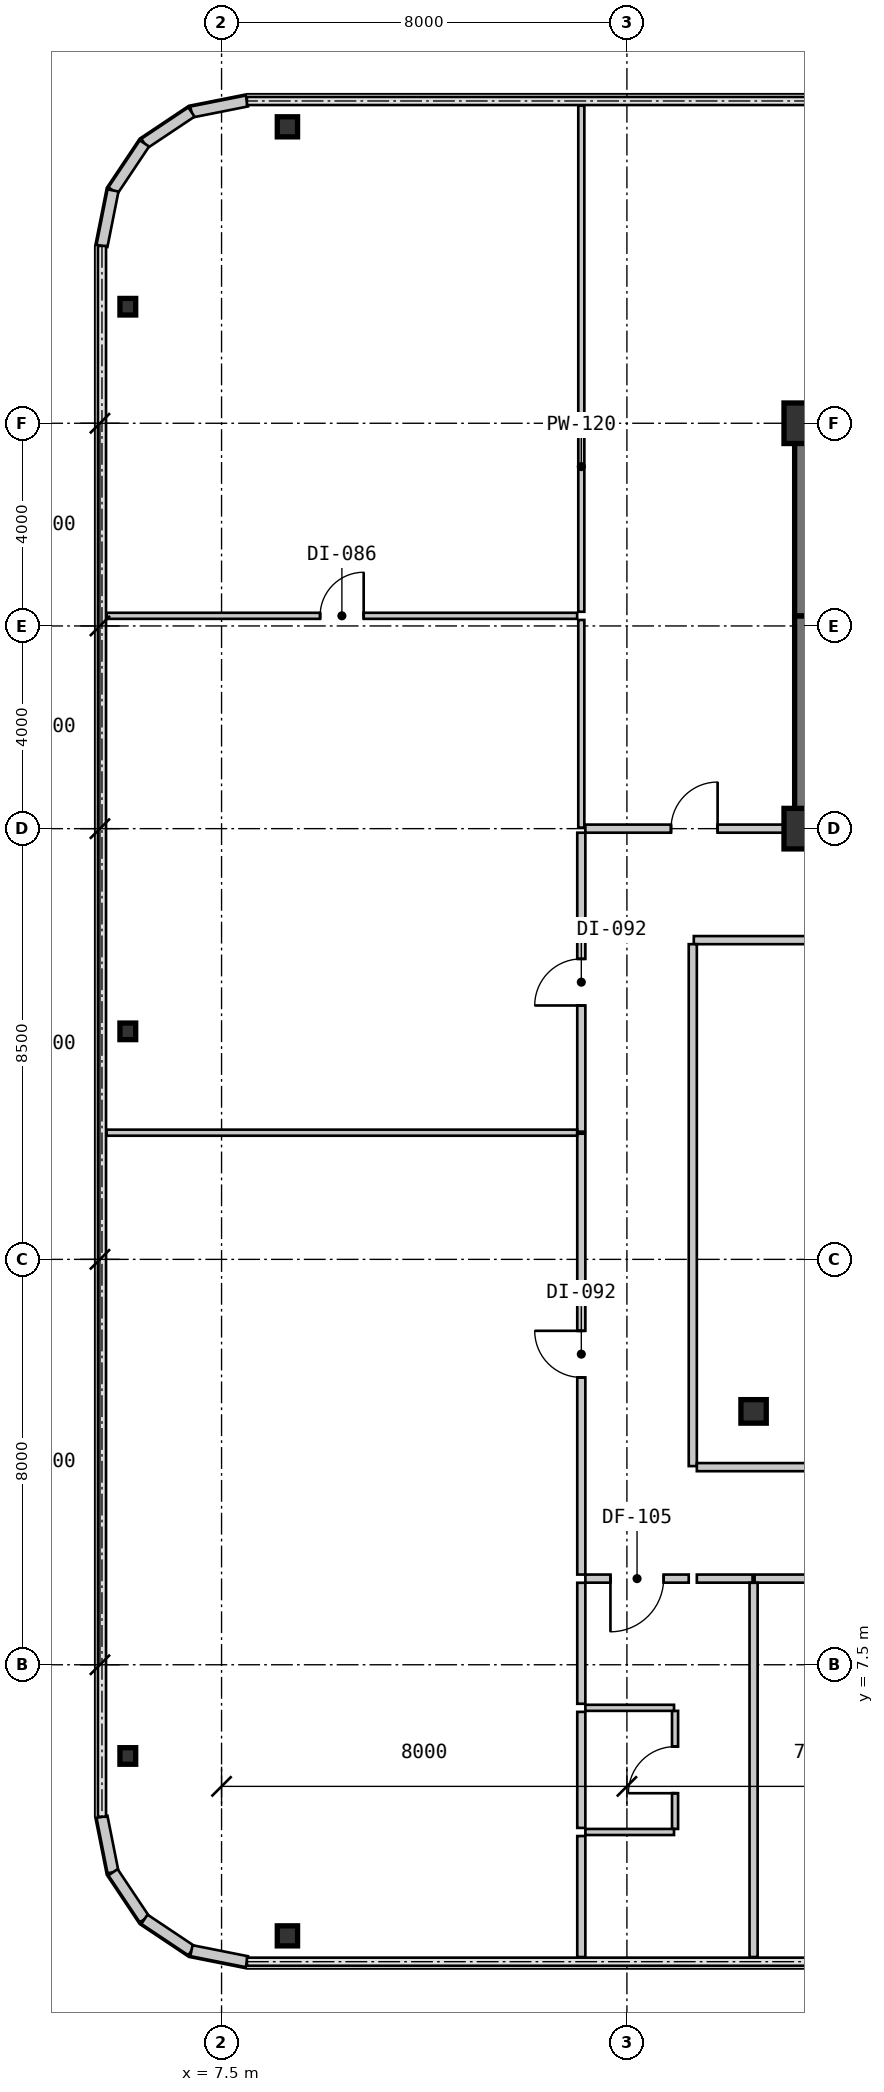
"""IFC4 building model, lengths in metres.
Left out: names, types, materials, properties, quantities, classifications, styles, units other than length and angle.
Written with IfcOpenShell. Run it as: python <this file> out.ifc"""

import sys

from ifc_helpers import new_model, si_unit, direction, frame, frame_2d, origin, origin_2d, place, context, subcontext, project, spatial, rectangle, i_section, extrude, source, transform, mapped, element, fill, save


model = new_model("IFC4")
c1 = context("Model", 3, precision=1e-05, world=origin(), true_north=direction((0.0, 1.0)))
c2 = subcontext(c1, "Body", "Model", "MODEL_VIEW")
j1 = project(units=[si_unit("LENGTHUNIT", "METRE"), si_unit("PLANEANGLEUNIT", "RADIAN")], contexts=[c1])
p1 = place(None, origin())
s1 = spatial("IfcSite", under=j1, at=p1, CompositionType="ELEMENT")
p2 = place(p1, origin())
s2 = spatial("IfcBuilding", under=s1, at=p2, CompositionType="ELEMENT")
p3 = place(p2, frame((0.0, 0.0, 51.45)))
s3 = spatial("IfcBuildingStorey", under=s2, at=p3, CompositionType="ELEMENT", Elevation=51.45)
m1 = source(origin(), c2, "Body", "SweptSolid", [
    extrude(rectangle(XDim=0.8, YDim=0.8, at=origin_2d()), origin(), (0.0, 0.0, 1.0), 3.15),
])
for number, where, z_axis, x_axis in (
    (1, (19.0, 24.0, 0.0), (0.0, 0.0, 1.0), (1.0, 0.0, 0.0)),
    (2, (19.0, 32.0, 0.0), (0.0, 0.0, 1.0), (1.0, 0.0, 0.0)),
):
    element("IfcColumn", number, at=place(p3, frame(where, z_axis=z_axis, x_axis=x_axis)), inside=s3, PredefinedType="COLUMN", context=c2, shape_type="MappedRepresentation", body=[
        mapped(m1, transform((0.0, 0.0, 0.0), scale=1.0)),
    ])
m2 = source(origin(), c2, "Body", "SweptSolid", [
    extrude(i_section(OverallWidth=0.5, OverallDepth=0.464, WebThickness=0.022, FlangeThickness=0.034, at=origin_2d()), origin(), (0.0, 0.0, 1.0), 3.15),
])
p4 = place(p3, frame((18.0, 12.5, 0.0), z_axis=(0.0, 0.0, 1.0), x_axis=(1.0, 0.0, 0.0)))
e3 = element("IfcColumn", 3, at=p4, inside=s3, PredefinedType="COLUMN", context=c2, shape_type="MappedRepresentation", body=[
    mapped(m2, transform((0.0, 0.0, 0.0), scale=1.0)),
])
m3 = source(origin(), c2, "Body", "SweptSolid", [
    extrude(i_section(OverallWidth=0.4, OverallDepth=0.396, WebThickness=0.022, FlangeThickness=0.034, at=origin_2d()), origin(), (0.0, 0.0, 1.0), 3.15),
])
for number, where, z_axis, x_axis in (
    (4, (8.8, 2.15, 0.0), (0.0, 0.0, 1.0), (1.0, 0.0, 0.0)),
    (5, (8.8, 37.85, 0.0), (0.0, 0.0, 1.0), (1.0, 0.0, 0.0)),
):
    element("IfcColumn", number, at=place(p3, frame(where, z_axis=z_axis, x_axis=x_axis)), inside=s3, PredefinedType="COLUMN", context=c2, shape_type="MappedRepresentation", body=[
        mapped(m3, transform((0.0, 0.0, 0.0), scale=1.0)),
    ])
m4 = source(origin(), c2, "Body", "SweptSolid", [
    extrude(i_section(OverallWidth=0.311, OverallDepth=0.327, WebThickness=0.016, FlangeThickness=0.025, at=origin_2d()), origin(), (0.0, 0.0, 1.0), 3.15),
])
for number, where, z_axis, x_axis in (
    (6, (5.65, 5.7, 0.0), (0.0, 0.0, 1.0), (1.0, 0.0, 0.0)),
    (7, (5.65, 20.0, 0.0), (0.0, 0.0, 1.0), (1.0, 0.0, 0.0)),
    (8, (5.65, 34.3, 0.0), (0.0, 0.0, 1.0), (1.0, 0.0, 0.0)),
):
    element("IfcColumn", number, at=place(p3, frame(where, z_axis=z_axis, x_axis=x_axis)), inside=s3, PredefinedType="COLUMN", context=c2, shape_type="MappedRepresentation", body=[
        mapped(m4, transform((0.0, 0.0, 0.0), scale=1.0)),
    ])
m5 = source(origin(), c2, "Body", "SweptSolid", [
    extrude(rectangle(XDim=1.116, YDim=0.22, at=frame_2d((0.558, 0.0))), origin(), (0.0, 0.0, 1.0), 2.93),
])
for number, where, z_axis, x_axis in (
    (9, (8.0, 38.36, 0.0), (0.0, 0.0, 1.0), (-0.981, -0.195, 0.0)),
    (10, (6.906, 38.142, 0.0), (0.0, 0.0, 1.0), (-0.831, -0.556, 0.0)),
    (11, (5.978, 37.522, 0.0), (0.0, 0.0, 1.0), (-0.556, -0.831, 0.0)),
    (12, (5.358, 36.594, 0.0), (0.0, 0.0, 1.0), (-0.195, -0.981, 0.0)),
    (13, (5.14, 4.5, 0.0), (0.0, 0.0, 1.0), (0.195, -0.981, 0.0)),
    (14, (5.358, 3.406, 0.0), (0.0, 0.0, 1.0), (0.556, -0.831, 0.0)),
    (15, (5.978, 2.478, 0.0), (0.0, 0.0, 1.0), (0.831, -0.556, 0.0)),
    (16, (6.906, 1.858, 0.0), (0.0, 0.0, 1.0), (0.981, -0.195, 0.0)),
):
    element("IfcWall", number, at=place(p3, frame(where, z_axis=z_axis, x_axis=x_axis)), inside=s3, PredefinedType="SOLIDWALL", context=c2, shape_type="MappedRepresentation", body=[
        mapped(m5, transform((0.0, 0.0, 0.0), scale=1.0)),
    ])
m6 = source(origin(), c2, "Body", "SweptSolid", [
    extrude(rectangle(XDim=9.19, YDim=0.38, at=frame_2d((4.595, 0.0))), origin(), (0.0, 0.0, 1.0), 2.93),
])
p5 = place(p3, frame((18.81, 32.0, 0.0), z_axis=(0.0, 0.0, 1.0), x_axis=(1.0, 0.0, 0.0)))
e17 = element("IfcWall", 17, at=p5, inside=s3, PredefinedType="SHEAR", context=c2, shape_type="MappedRepresentation", body=[
    mapped(m6, transform((0.0, 0.0, 0.0), scale=1.0)),
])
m7 = source(origin(), c2, "Body", "SweptSolid", [
    extrude(rectangle(XDim=4.01, YDim=0.38, at=frame_2d((2.005, 0.0))), origin(), (0.0, 0.0, 1.0), 2.93),
])
p6 = place(p3, frame((19.0, 24.19, 0.0), z_axis=(0.0, 0.0, 1.0), x_axis=(0.0, 1.0, 0.0)))
e18 = element("IfcWall", 18, at=p6, inside=s3, PredefinedType="SHEAR", context=c2, shape_type="MappedRepresentation", body=[
    mapped(m7, transform((0.0, 0.0, 0.0), scale=1.0)),
])
m8 = source(origin(), c2, "Body", "SweptSolid", [
    extrude(rectangle(XDim=3.61, YDim=0.38, at=frame_2d((1.805, 0.0))), origin(), (0.0, 0.0, 1.0), 2.93),
])
p7 = place(p3, frame((19.0, 28.2, 0.0), z_axis=(0.0, 0.0, 1.0), x_axis=(0.0, 1.0, 0.0)))
e19 = element("IfcWall", 19, at=p7, inside=s3, PredefinedType="SHEAR", context=c2, shape_type="MappedRepresentation", body=[
    mapped(m8, transform((0.0, 0.0, 0.0), scale=1.0)),
])
m9 = source(origin(), c2, "Body", "SweptSolid", [
    extrude(rectangle(XDim=4.98, YDim=0.38, at=frame_2d((2.49, 0.0))), origin(), (0.0, 0.0, 1.0), 2.93),
])
p8 = place(p3, frame((18.81, 24.0, 0.0), z_axis=(0.0, 0.0, 1.0), x_axis=(1.0, 0.0, 0.0)))
e20 = element("IfcWall", 20, at=p8, inside=s3, PredefinedType="SHEAR", context=c2, shape_type="MappedRepresentation", body=[
    mapped(m9, transform((0.0, 0.0, 0.0), scale=1.0)),
])
m10 = source(origin(), c2, "Body", "SweptSolid", [
    extrude(rectangle(XDim=21.159, YDim=0.16, at=frame_2d((10.58, 0.0))), origin(), (0.0, 0.0, 1.0), 2.93),
])
p9 = place(p3, frame((37.98, 21.8, 0.0), z_axis=(0.0, 0.0, 1.0), x_axis=(-1.0, 0.0, 0.0)))
e21 = element("IfcWall", 21, at=p9, inside=s3, PredefinedType="PARTITIONING", context=c2, shape_type="MappedRepresentation", body=[
    mapped(m10, transform((0.0, 0.0, 0.0), scale=1.0)),
])
m11 = source(origin(), c2, "Body", "SweptSolid", [
    extrude(rectangle(XDim=0.92, YDim=2.1, at=frame_2d((0.46, 1.05))), frame((0.0, 0.09, 0.0), z_axis=(0.0, -1.0, 0.0), x_axis=(1.0, 0.0, 0.0)), (0.0, 0.0, 1.0), 0.18),
])
p10 = place(p9, frame((10.12, 0.0, 0.0)))
e22 = element("IfcOpeningElement", 22, at=p10, cuts=e21, PredefinedType="OPENING", context=c2, shape_type="MappedRepresentation", body=[
    mapped(m11, transform((0.0, 0.0, 0.0), scale=1.0)),
])
m12 = source(origin(), c2, "Body", "SweptSolid", [
    extrude(rectangle(XDim=10.3, YDim=0.16, at=frame_2d((5.15, 0.0))), origin(), (0.0, 0.0, 1.0), 2.93),
])
p11 = place(p3, frame((16.8, 21.72, 0.0), z_axis=(0.0, 0.0, 1.0), x_axis=(0.0, -1.0, 0.0)))
e23 = element("IfcWall", 23, at=p11, inside=s3, PredefinedType="PARTITIONING", context=c2, shape_type="MappedRepresentation", body=[
    mapped(m12, transform((0.0, 0.0, 0.0), scale=1.0)),
])
m13 = source(origin(), c2, "Body", "SweptSolid", [
    extrude(rectangle(XDim=2.04, YDim=0.16, at=frame_2d((1.02, 0.0))), origin(), (0.0, 0.0, 1.0), 2.93),
])
p12 = place(p3, frame((16.72, 9.2, 0.0), z_axis=(0.0, 0.0, 1.0), x_axis=(-1.0, 0.0, 0.0)))
e24 = element("IfcWall", 24, at=p12, inside=s3, PredefinedType="PARTITIONING", context=c2, shape_type="MappedRepresentation", body=[
    mapped(m13, transform((0.0, 0.0, 0.0), scale=1.0)),
])
m14 = source(origin(), c2, "Body", "SweptSolid", [
    extrude(rectangle(XDim=1.05, YDim=2.1, at=frame_2d((0.525, 1.05))), frame((0.0, 0.09, 0.0), z_axis=(0.0, -1.0, 0.0), x_axis=(1.0, 0.0, 0.0)), (0.0, 0.0, 1.0), 0.18),
])
p13 = place(p12, frame((0.495, 0.0, 0.0)))
e25 = element("IfcOpeningElement", 25, at=p13, cuts=e24, PredefinedType="OPENING", context=c2, shape_type="MappedRepresentation", body=[
    mapped(m14, transform((0.0, 0.0, 0.0), scale=1.0)),
])
m15 = source(origin(), c2, "Body", "SweptSolid", [
    extrude(rectangle(XDim=8.7, YDim=0.16, at=frame_2d((4.35, 0.0))), origin(), (0.0, 0.0, 1.0), 2.93),
])
p14 = place(p3, frame((14.6, 9.28, 0.0), z_axis=(0.0, 0.0, 1.0), x_axis=(0.0, 1.0, 0.0)))
e26 = element("IfcWall", 26, at=p14, inside=s3, PredefinedType="PARTITIONING", context=c2, shape_type="MappedRepresentation", body=[
    mapped(m15, transform((0.0, 0.0, 0.0), scale=1.0)),
])
p15 = place(p14, frame((3.89, 0.0, 0.0)))
e27 = element("IfcOpeningElement", 27, at=p15, cuts=e26, PredefinedType="OPENING", context=c2, shape_type="MappedRepresentation", body=[
    mapped(m11, transform((0.0, 0.0, 0.0), scale=1.0)),
])
m16 = source(origin(), c2, "Body", "SweptSolid", [
    extrude(rectangle(XDim=5.9, YDim=0.16, at=frame_2d((2.95, 0.0))), origin(), (0.0, 0.0, 1.0), 2.93),
])
p16 = place(p3, frame((14.6, 18.02, 0.0), z_axis=(0.0, 0.0, 1.0), x_axis=(0.0, 1.0, 0.0)))
e28 = element("IfcWall", 28, at=p16, inside=s3, PredefinedType="PARTITIONING", context=c2, shape_type="MappedRepresentation", body=[
    mapped(m16, transform((0.0, 0.0, 0.0), scale=1.0)),
])
p17 = place(p16, frame((2.49, 0.0, 0.0)))
e29 = element("IfcOpeningElement", 29, at=p17, cuts=e28, PredefinedType="OPENING", context=c2, shape_type="MappedRepresentation", body=[
    mapped(m11, transform((0.0, 0.0, 0.0), scale=1.0)),
])
m17 = source(origin(), c2, "Body", "SweptSolid", [
    extrude(rectangle(XDim=4.13, YDim=0.16, at=frame_2d((2.065, 0.0))), origin(), (0.0, 0.0, 1.0), 2.93),
])
p18 = place(p3, frame((14.68, 24.0, 0.0), z_axis=(0.0, 0.0, 1.0), x_axis=(1.0, 0.0, 0.0)))
e30 = element("IfcWall", 30, at=p18, inside=s3, PredefinedType="PARTITIONING", context=c2, shape_type="MappedRepresentation", body=[
    mapped(m17, transform((0.0, 0.0, 0.0), scale=1.0)),
])
p19 = place(p18, frame((1.69, 0.0, 0.0)))
e31 = element("IfcOpeningElement", 31, at=p19, cuts=e30, PredefinedType="OPENING", context=c2, shape_type="MappedRepresentation", body=[
    mapped(m11, transform((0.0, 0.0, 0.0), scale=1.0)),
])
m18 = source(origin(), c2, "Body", "SweptSolid", [
    extrude(rectangle(XDim=21.1, YDim=0.16, at=frame_2d((10.55, 0.0))), origin(), (0.0, 0.0, 1.0), 2.93),
])
p20 = place(p3, frame((16.88, 11.4, 0.0), z_axis=(0.0, 0.0, 1.0), x_axis=(1.0, 0.0, 0.0)))
e32 = element("IfcWall", 32, at=p20, inside=s3, PredefinedType="PARTITIONING", context=c2, shape_type="MappedRepresentation", body=[
    mapped(m18, transform((0.0, 0.0, 0.0), scale=1.0)),
])
m19 = source(origin(), c2, "Body", "SweptSolid", [
    extrude(rectangle(XDim=1.1, YDim=0.16, at=frame_2d((0.55, 0.0))), origin(), (0.0, 0.0, 1.0), 2.93),
])
p21 = place(p3, frame((17.98, 9.2, 0.0), z_axis=(0.0, 0.0, 1.0), x_axis=(-1.0, 0.0, 0.0)))
e33 = element("IfcWall", 33, at=p21, inside=s3, PredefinedType="PARTITIONING", context=c2, shape_type="MappedRepresentation", body=[
    mapped(m19, transform((0.0, 0.0, 0.0), scale=1.0)),
])
m20 = source(origin(), c2, "Body", "SweptSolid", [
    extrude(rectangle(XDim=6.159, YDim=0.16, at=frame_2d((3.08, 0.0))), origin(), (0.0, 0.0, 1.0), 2.93),
])
p22 = place(p3, frame((24.18, 9.2, 0.0), z_axis=(0.0, 0.0, 1.0), x_axis=(-1.0, 0.0, 0.0)))
e34 = element("IfcWall", 34, at=p22, inside=s3, PredefinedType="PARTITIONING", context=c2, shape_type="MappedRepresentation", body=[
    mapped(m20, transform((0.0, 0.0, 0.0), scale=1.0)),
])
p23 = place(p22, frame((2.62, 0.0, 0.0)))
e35 = element("IfcOpeningElement", 35, at=p23, cuts=e34, PredefinedType="OPENING", context=c2, shape_type="MappedRepresentation", body=[
    mapped(m11, transform((0.0, 0.0, 0.0), scale=1.0)),
])
m21 = source(origin(), c2, "Body", "SweptSolid", [
    extrude(rectangle(XDim=2.33, YDim=0.12, at=frame_2d((1.165, 0.0))), origin(), (0.0, 0.0, 1.0), 2.93),
])
p24 = place(p3, frame((16.45, 4.26, 0.0), z_axis=(0.0, 0.0, 1.0), x_axis=(0.0, 1.0, 0.0)))
e36 = element("IfcWall", 36, at=p24, inside=s3, PredefinedType="PARTITIONING", context=c2, shape_type="MappedRepresentation", body=[
    mapped(m21, transform((0.0, 0.0, 0.0), scale=1.0)),
])
m22 = source(origin(), c2, "Body", "SweptSolid", [
    extrude(rectangle(XDim=0.92, YDim=2.1, at=frame_2d((0.46, 1.05))), frame((0.0, 0.07, 0.0), z_axis=(0.0, -1.0, 0.0), x_axis=(1.0, 0.0, 0.0)), (0.0, 0.0, 1.0), 0.14),
])
p25 = place(p24, frame((0.705, 0.0, 0.0)))
e37 = element("IfcOpeningElement", 37, at=p25, cuts=e36, PredefinedType="OPENING", context=c2, shape_type="MappedRepresentation", body=[
    mapped(m22, transform((0.0, 0.0, 0.0), scale=1.0)),
])
m23 = source(origin(), c2, "Body", "SweptSolid", [
    extrude(rectangle(XDim=1.75, YDim=0.12, at=frame_2d((0.875, 0.0))), origin(), (0.0, 0.0, 1.0), 2.93),
])
for number, where, z_axis, x_axis in (
    (38, (14.68, 4.2, 0.0), (0.0, 0.0, 1.0), (1.0, 0.0, 0.0)),
    (39, (16.43, 6.65, 0.0), (0.0, 0.0, 1.0), (-1.0, 0.0, 0.0)),
):
    element("IfcWall", number, at=place(p3, frame(where, z_axis=z_axis, x_axis=x_axis)), inside=s3, PredefinedType="PARTITIONING", context=c2, shape_type="MappedRepresentation", body=[
        mapped(m23, transform((0.0, 0.0, 0.0), scale=1.0)),
    ])
m24 = source(origin(), c2, "Body", "SweptSolid", [
    extrude(rectangle(XDim=7.386, YDim=0.16, at=frame_2d((3.693, 0.0))), origin(), (0.0, 0.0, 1.0), 2.93),
])
p26 = place(p3, frame((18.0, 9.118, 0.0), z_axis=(0.0, 0.0, 1.0), x_axis=(0.0, -1.0, 0.0)))
e40 = element("IfcWall", 40, at=p26, inside=s3, PredefinedType="PARTITIONING", context=c2, shape_type="MappedRepresentation", body=[
    mapped(m24, transform((0.0, 0.0, 0.0), scale=1.0)),
])
m25 = source(origin(), c2, "Body", "SweptSolid", [
    extrude(rectangle(XDim=2.388, YDim=0.16, at=frame_2d((1.194, 0.0))), origin(), (0.0, 0.0, 1.0), 2.93),
])
p27 = place(p3, frame((14.6, 1.732, 0.0), z_axis=(0.0, 0.0, 1.0), x_axis=(0.0, 1.0, 0.0)))
e41 = element("IfcWall", 41, at=p27, inside=s3, PredefinedType="PARTITIONING", context=c2, shape_type="MappedRepresentation", body=[
    mapped(m25, transform((0.0, 0.0, 0.0), scale=1.0)),
])
m26 = source(origin(), c2, "Body", "SweptSolid", [
    extrude(rectangle(XDim=2.388, YDim=0.16, at=frame_2d((1.194, 0.0))), origin(), (0.0, 0.0, 1.0), 2.93),
])
p28 = place(p3, frame((14.6, 6.73, 0.0), z_axis=(0.0, 0.0, 1.0), x_axis=(0.0, 1.0, 0.0)))
e42 = element("IfcWall", 42, at=p28, inside=s3, PredefinedType="PARTITIONING", context=c2, shape_type="MappedRepresentation", body=[
    mapped(m26, transform((0.0, 0.0, 0.0), scale=1.0)),
])
m27 = source(origin(), c2, "Body", "SweptSolid", [
    extrude(rectangle(XDim=2.29, YDim=0.16, at=frame_2d((1.145, 0.0))), origin(), (0.0, 0.0, 1.0), 2.93),
])
p29 = place(p3, frame((14.6, 4.28, 0.0), z_axis=(0.0, 0.0, 1.0), x_axis=(0.0, 1.0, 0.0)))
e43 = element("IfcWall", 43, at=p29, inside=s3, PredefinedType="PARTITIONING", context=c2, shape_type="MappedRepresentation", body=[
    mapped(m27, transform((0.0, 0.0, 0.0), scale=1.0)),
])
m28 = source(origin(), c2, "Body", "SweptSolid", [
    extrude(rectangle(XDim=9.286, YDim=0.12, at=frame_2d((4.643, 0.0))), origin(), (0.0, 0.0, 1.0), 2.93),
])
p30 = place(p3, frame((5.232, 18.0, 0.0), z_axis=(0.0, 0.0, 1.0), x_axis=(1.0, 0.0, 0.0)))
e44 = element("IfcWall", 44, at=p30, inside=s3, PredefinedType="PARTITIONING", context=c2, shape_type="MappedRepresentation", body=[
    mapped(m28, transform((0.0, 0.0, 0.0), scale=1.0)),
])
p31 = place(p3, frame((5.232, 28.2, 0.0), z_axis=(0.0, 0.0, 1.0), x_axis=(1.0, 0.0, 0.0)))
e45 = element("IfcWall", 45, at=p31, inside=s3, PredefinedType="PARTITIONING", context=c2, shape_type="MappedRepresentation", body=[
    mapped(m28, transform((0.0, 0.0, 0.0), scale=1.0)),
])
m29 = source(origin(), c2, "Body", "SweptSolid", [
    extrude(rectangle(XDim=0.86, YDim=2.1, at=frame_2d((0.43, 1.05))), frame((0.0, 0.07, 0.0), z_axis=(0.0, -1.0, 0.0), x_axis=(1.0, 0.0, 0.0)), (0.0, 0.0, 1.0), 0.14),
])
p32 = place(p31, frame((4.213, 0.0, 0.0)))
e46 = element("IfcOpeningElement", 46, at=p32, cuts=e45, PredefinedType="OPENING", context=c2, shape_type="MappedRepresentation", body=[
    mapped(m29, transform((0.0, 0.0, 0.0), scale=1.0)),
])
m30 = source(origin(), c2, "Body", "SweptSolid", [
    extrude(rectangle(XDim=4.098, YDim=0.12, at=frame_2d((2.049, 0.0))), origin(), (0.0, 0.0, 1.0), 2.93),
])
p33 = place(p3, frame((14.6, 28.118, 0.0), z_axis=(0.0, 0.0, 1.0), x_axis=(0.0, -1.0, 0.0)))
e47 = element("IfcWall", 47, at=p33, inside=s3, PredefinedType="PARTITIONING", context=c2, shape_type="MappedRepresentation", body=[
    mapped(m30, transform((0.0, 0.0, 0.0), scale=1.0)),
])
m31 = source(origin(), c2, "Body", "SweptSolid", [
    extrude(rectangle(XDim=9.99, YDim=0.12, at=frame_2d((4.995, 0.0))), origin(), (0.0, 0.0, 1.0), 2.93),
])
p34 = place(p3, frame((14.6, 38.27, 0.0), z_axis=(0.0, 0.0, 1.0), x_axis=(0.0, -1.0, 0.0)))
e48 = element("IfcWall", 48, at=p34, inside=s3, PredefinedType="PARTITIONING", context=c2, shape_type="MappedRepresentation", body=[
    mapped(m31, transform((0.0, 0.0, 0.0), scale=1.0)),
])
m32 = source(origin(), c2, "Body", "SweptSolid", [
    extrude(rectangle(XDim=1.05, YDim=2.1, at=frame_2d((0.525, 1.05))), frame((0.0, 0.025, 0.0), z_axis=(0.0, -1.0, 0.0), x_axis=(1.0, 0.0, 0.0)), (0.0, 0.0, 1.0), 0.05),
])
p35 = place(p13, origin())
e49 = element("IfcDoor", 49, at=p35, inside=s3, OperationType="SINGLE_SWING_RIGHT", PredefinedType="DOOR", context=c2, shape_type="MappedRepresentation", body=[
    mapped(m32, transform((0.0, 0.0, 0.0), scale=1.0)),
])
fill(e25, e49)
m33 = source(origin(), c2, "Body", "SweptSolid", [
    extrude(rectangle(XDim=0.92, YDim=2.1, at=frame_2d((0.46, 1.05))), frame((0.0, 0.025, 0.0), z_axis=(0.0, -1.0, 0.0), x_axis=(1.0, 0.0, 0.0)), (0.0, 0.0, 1.0), 0.05),
])
p36 = place(p15, origin())
e50 = element("IfcDoor", 50, at=p36, inside=s3, OperationType="SINGLE_SWING_RIGHT", PredefinedType="DOOR", context=c2, shape_type="MappedRepresentation", body=[
    mapped(m33, transform((0.0, 0.0, 0.0), scale=1.0)),
])
fill(e27, e50)
p37 = place(p17, origin())
e51 = element("IfcDoor", 51, at=p37, inside=s3, OperationType="SINGLE_SWING_LEFT", PredefinedType="DOOR", context=c2, shape_type="MappedRepresentation", body=[
    mapped(m33, transform((0.0, 0.0, 0.0), scale=1.0)),
])
fill(e29, e51)
p38 = place(p19, origin())
e52 = element("IfcDoor", 52, at=p38, inside=s3, OperationType="SINGLE_SWING_RIGHT", PredefinedType="DOOR", context=c2, shape_type="MappedRepresentation", body=[
    mapped(m33, transform((0.0, 0.0, 0.0), scale=1.0)),
])
fill(e31, e52)
p39 = place(p25, origin())
e53 = element("IfcDoor", 53, at=p39, inside=s3, OperationType="SINGLE_SWING_LEFT", PredefinedType="DOOR", context=c2, shape_type="MappedRepresentation", body=[
    mapped(m33, transform((0.0, 0.0, 0.0), scale=1.0)),
])
fill(e37, e53)
m34 = source(origin(), c2, "Body", "SweptSolid", [
    extrude(rectangle(XDim=0.86, YDim=2.1, at=frame_2d((0.43, 1.05))), frame((0.0, 0.025, 0.0), z_axis=(0.0, -1.0, 0.0), x_axis=(1.0, 0.0, 0.0)), (0.0, 0.0, 1.0), 0.05),
])
p40 = place(p32, origin())
e54 = element("IfcDoor", 54, at=p40, inside=s3, OperationType="SINGLE_SWING_RIGHT", PredefinedType="DOOR", context=c2, shape_type="MappedRepresentation", body=[
    mapped(m34, transform((0.0, 0.0, 0.0), scale=1.0)),
])
fill(e46, e54)
save(model, sys.argv[1])
